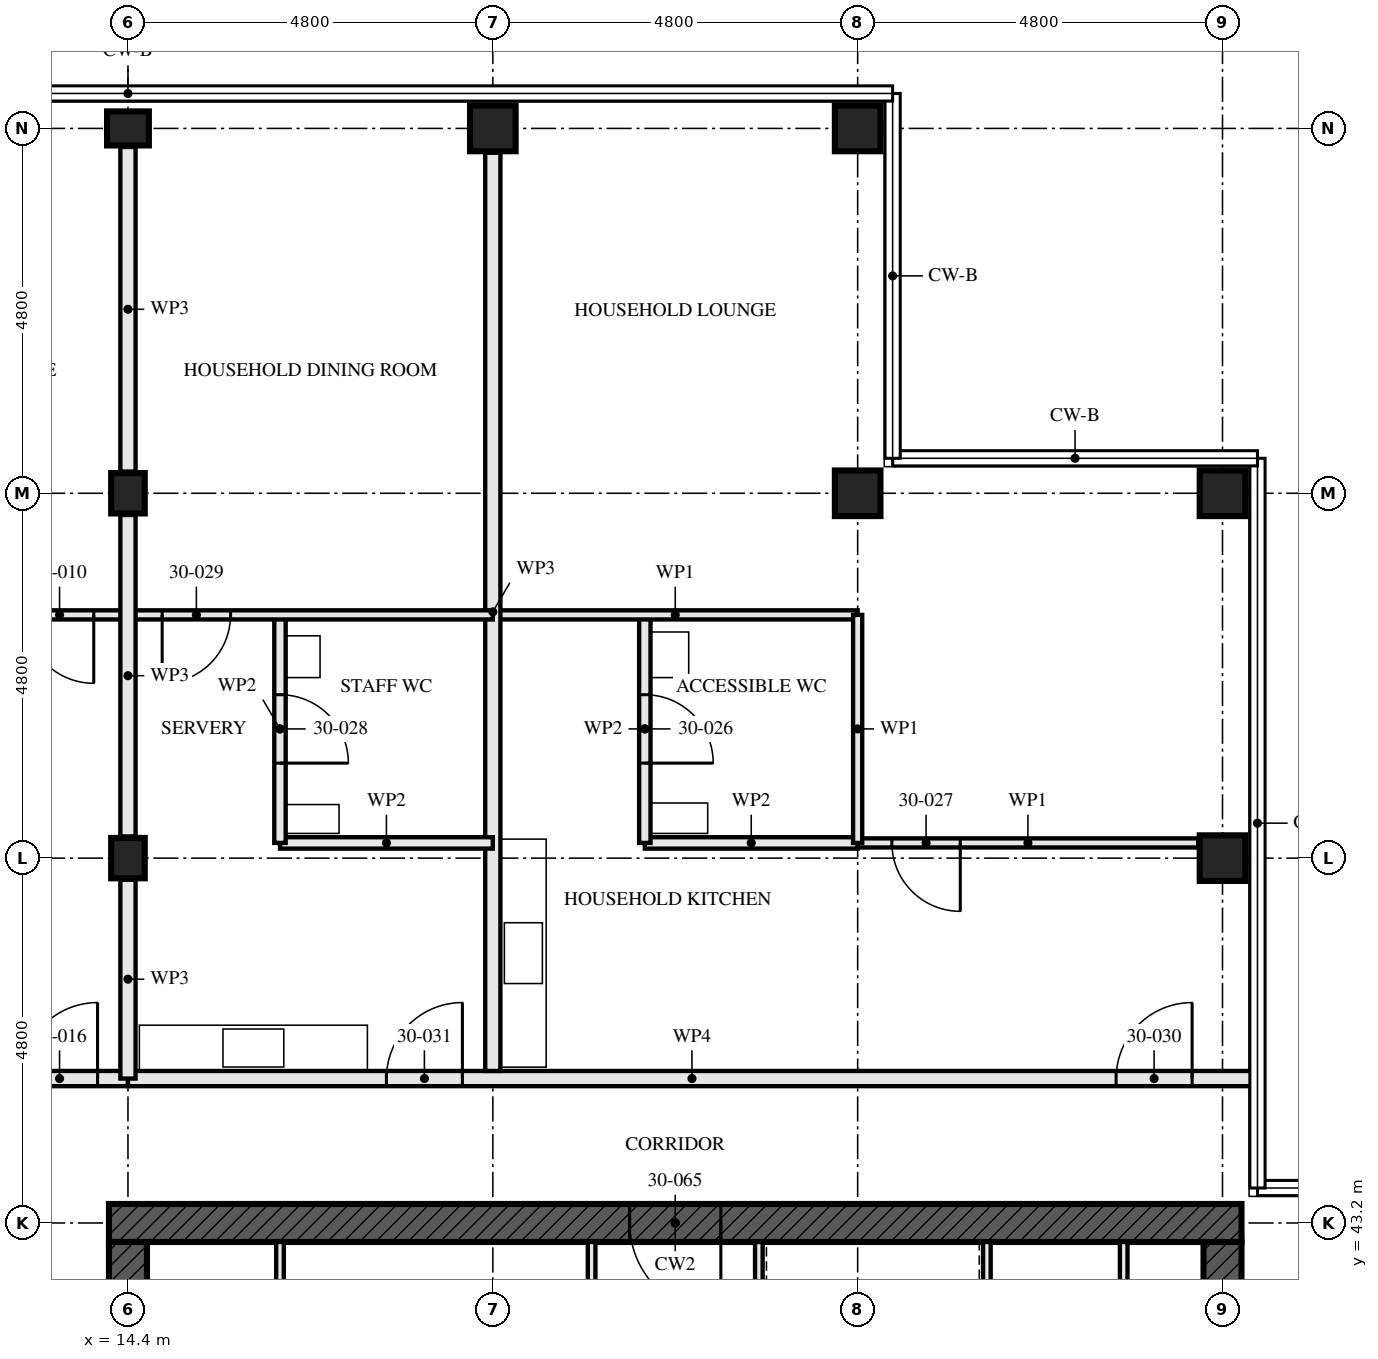
"""IFC4 building model, lengths in metres.
Left out: names, types, materials, properties, quantities, classifications, styles, units other than length and angle.
Written with IfcOpenShell. Run it as: python <this file> out.ifc"""

import sys

from ifc_helpers import new_model, si_unit, direction, frame, frame_2d, origin, origin_2d, place, context, subcontext, project, spatial, rectangle, hollow_rectangle, i_section, extrude, element, fill, save


model = new_model("IFC4")
c1 = context("Model", 3, precision=1e-05, world=origin(), true_north=direction((0.0, 1.0)))
c2 = subcontext(c1, "Body", "Model", "MODEL_VIEW")
j1 = project(units=[si_unit("LENGTHUNIT", "METRE"), si_unit("PLANEANGLEUNIT", "RADIAN")], contexts=[c1])
p1 = place(None, origin())
s1 = spatial("IfcSite", under=j1, at=p1, CompositionType="ELEMENT")
p2 = place(p1, origin())
s2 = spatial("IfcBuilding", under=s1, at=p2, CompositionType="ELEMENT")
p3 = place(p2, frame((0.0, 0.0, 112.0)))
s3 = spatial("IfcBuildingStorey", under=s2, at=p3, CompositionType="ELEMENT", Elevation=112.0)
for number, where, z_axis, x_axis in (
    (1, (14.4, 48.0, 0.0), (0.0, 0.0, 1.0), (1.0, 0.0, 0.0)),
    (2, (14.4, 52.8, 0.0), (0.0, 0.0, 1.0), (1.0, 0.0, 0.0)),
):
    element("IfcColumn", number, at=place(p3, frame(where, z_axis=z_axis, x_axis=x_axis)), inside=s3, PredefinedType="COLUMN", context=c2, shape_type="SweptSolid", body=[
        extrude(i_section(OverallWidth=0.442, OverallDepth=0.531, WebThickness=0.066, FlangeThickness=0.106, FilletRadius=0.015, at=origin_2d()), origin(), (0.0, 0.0, 1.0), 3.5),
    ])
p4 = place(p3, frame((14.4, 57.6, 0.0), z_axis=(0.0, 0.0, 1.0), x_axis=(0.0, 1.0, 0.0)))
e3 = element("IfcColumn", 3, at=p4, inside=s3, PredefinedType="COLUMN", context=c2, shape_type="SweptSolid", body=[
    extrude(i_section(OverallWidth=0.448, OverallDepth=0.55, WebThickness=0.072, FlangeThickness=0.115, FilletRadius=0.015, at=origin_2d()), origin(), (0.0, 0.0, 1.0), 3.5),
])
for number, where, z_axis, x_axis in (
    (4, (19.2, 57.6, 0.0), (0.0, 0.0, 1.0), (0.0, 1.0, 0.0)),
    (5, (24.0, 52.8, 0.0), (0.0, 0.0, 1.0), (0.0, 1.0, 0.0)),
    (6, (24.0, 57.6, 0.0), (0.0, 0.0, 1.0), (0.0, 1.0, 0.0)),
):
    element("IfcColumn", number, at=place(p3, frame(where, z_axis=z_axis, x_axis=x_axis)), inside=s3, PredefinedType="COLUMN", context=c2, shape_type="SweptSolid", body=[
        extrude(hollow_rectangle(XDim=0.6, YDim=0.6, WallThickness=0.06, at=origin_2d()), origin(), (0.0, 0.0, 1.0), 3.5),
    ])
p5 = place(p3, frame((28.8, 48.0, 0.0), z_axis=(0.0, 0.0, 1.0), x_axis=(1.0, 0.0, 0.0)))
e7 = element("IfcColumn", 7, at=p5, inside=s3, PredefinedType="COLUMN", context=c2, shape_type="SweptSolid", body=[
    extrude(hollow_rectangle(XDim=0.6, YDim=0.6, WallThickness=0.08, at=origin_2d()), origin(), (0.0, 0.0, 1.0), 3.5),
])
p6 = place(p3, frame((28.8, 52.8, 0.0), z_axis=(0.0, 0.0, 1.0), x_axis=(0.0, 1.0, 0.0)))
e8 = element("IfcColumn", 8, at=p6, inside=s3, PredefinedType="COLUMN", context=c2, shape_type="SweptSolid", body=[
    extrude(hollow_rectangle(XDim=0.6, YDim=0.6, WallThickness=0.06, at=origin_2d()), origin(), (0.0, 0.0, 1.0), 3.5),
])
p7 = place(p3, frame((29.05, 43.2, -0.17), z_axis=(0.0, 0.0, 1.0), x_axis=(-1.0, 0.0, 0.0)))
e9 = element("IfcWall", 9, at=p7, inside=s3, PredefinedType="SHEAR", context=c2, shape_type="SweptSolid", body=[
    extrude(rectangle(XDim=14.9, YDim=0.5, at=frame_2d((7.45, 0.0))), origin(), (0.0, 0.0, 1.0), 3.5),
])
p8 = place(p7, frame((6.85, 0.0, 0.17)))
e10 = element("IfcOpeningElement", 10, at=p8, cuts=e9, PredefinedType="OPENING", context=c2, shape_type="SweptSolid", body=[
    extrude(rectangle(XDim=1.2, YDim=2.1, at=frame_2d((0.6, 1.05))), frame((0.0, 0.26, 0.0), z_axis=(0.0, -1.0, 0.0), x_axis=(1.0, 0.0, 0.0)), (0.0, 0.0, 1.0), 0.521),
])
p9 = place(p3, frame((14.4, 42.95, -0.17), z_axis=(0.0, 0.0, 1.0), x_axis=(0.0, -1.0, 0.0)))
e11 = element("IfcWall", 11, at=p9, inside=s3, PredefinedType="SHEAR", context=c2, shape_type="SweptSolid", body=[
    extrude(rectangle(XDim=13.9, YDim=0.5, at=frame_2d((6.95, 0.0))), origin(), (0.0, 0.0, 1.0), 3.5),
])
p10 = place(p9, frame((6.35, 0.0, 0.17)))
e12 = element("IfcOpeningElement", 12, at=p10, cuts=e11, PredefinedType="OPENING", context=c2, shape_type="SweptSolid", body=[
    extrude(rectangle(XDim=1.2, YDim=2.1, at=frame_2d((0.6, 1.05))), frame((0.0, 0.26, 0.0), z_axis=(0.0, -1.0, 0.0), x_axis=(1.0, 0.0, 0.0)), (0.0, 0.0, 1.0), 0.521),
])
p11 = place(p3, frame((28.8, 29.05, -0.17), z_axis=(0.0, 0.0, 1.0), x_axis=(0.0, 1.0, 0.0)))
e13 = element("IfcWall", 13, at=p11, inside=s3, PredefinedType="SHEAR", context=c2, shape_type="SweptSolid", body=[
    extrude(rectangle(XDim=13.9, YDim=0.5, at=frame_2d((6.95, 0.0))), origin(), (0.0, 0.0, 1.0), 3.5),
])
p12 = place(p11, frame((6.35, 0.0, 0.17)))
e14 = element("IfcOpeningElement", 14, at=p12, cuts=e13, PredefinedType="OPENING", context=c2, shape_type="SweptSolid", body=[
    extrude(rectangle(XDim=1.2, YDim=2.1, at=frame_2d((0.6, 1.05))), frame((0.0, 0.26, 0.0), z_axis=(0.0, -1.0, 0.0), x_axis=(1.0, 0.0, 0.0)), (0.0, 0.0, 1.0), 0.521),
])
p13 = place(p3, frame((14.4, 51.2, 0.0), z_axis=(0.0, 0.0, 1.0), x_axis=(-1.0, 0.0, 0.0)))
e15 = element("IfcWall", 15, at=p13, inside=s3, PredefinedType="PARTITIONING", context=c2, shape_type="SweptSolid", body=[
    extrude(rectangle(XDim=4.8, YDim=0.12, at=frame_2d((2.4, 0.0))), origin(), (0.0, 0.0, 1.0), 3.33),
])
p14 = place(p13, frame((0.45, 0.0, 0.0)))
e16 = element("IfcOpeningElement", 16, at=p14, cuts=e15, PredefinedType="OPENING", context=c2, shape_type="SweptSolid", body=[
    extrude(rectangle(XDim=0.9, YDim=2.1, at=frame_2d((0.45, 1.05))), frame((0.0, 0.071, 0.0), z_axis=(0.0, -1.0, 0.0), x_axis=(1.0, 0.0, 0.0)), (0.0, 0.0, 1.0), 0.141),
])
p15 = place(p13, frame((2.925, 0.0, 0.0)))
e17 = element("IfcOpeningElement", 17, at=p15, cuts=e15, PredefinedType="OPENING", context=c2, shape_type="SweptSolid", body=[
    extrude(rectangle(XDim=0.95, YDim=2.1, at=frame_2d((0.475, 1.05))), frame((0.0, 0.071, 0.0), z_axis=(0.0, -1.0, 0.0), x_axis=(1.0, 0.0, 0.0)), (0.0, 0.0, 1.0), 0.141),
])
p16 = place(p3, frame((14.4, 45.1, 0.0), z_axis=(0.0, 0.0, 1.0), x_axis=(-1.0, 0.0, 0.0)))
e18 = element("IfcWall", 18, at=p16, inside=s3, PredefinedType="PARTITIONING", context=c2, shape_type="SweptSolid", body=[
    extrude(rectangle(XDim=9.6, YDim=0.2, at=frame_2d((4.8, 0.0))), origin(), (0.0, 0.0, 1.0), 3.33),
])
p17 = place(p16, frame((0.4, 0.0, 0.0)))
e19 = element("IfcOpeningElement", 19, at=p17, cuts=e18, PredefinedType="OPENING", context=c2, shape_type="SweptSolid", body=[
    extrude(rectangle(XDim=1.0, YDim=2.1, at=frame_2d((0.5, 1.05))), frame((0.0, 0.111, 0.0), z_axis=(0.0, -1.0, 0.0), x_axis=(1.0, 0.0, 0.0)), (0.0, 0.0, 1.0), 0.221),
])
p18 = place(p16, frame((5.2, 0.0, 0.0)))
e20 = element("IfcOpeningElement", 20, at=p18, cuts=e18, PredefinedType="OPENING", context=c2, shape_type="SweptSolid", body=[
    extrude(rectangle(XDim=1.0, YDim=2.1, at=frame_2d((0.5, 1.05))), frame((0.0, 0.111, 0.0), z_axis=(0.0, -1.0, 0.0), x_axis=(1.0, 0.0, 0.0)), (0.0, 0.0, 1.0), 0.221),
])
p19 = place(p3, frame((21.2, 51.2, 0.0), z_axis=(0.0, 0.0, 1.0), x_axis=(0.0, -1.0, 0.0)))
e21 = element("IfcWall", 21, at=p19, inside=s3, PredefinedType="PARTITIONING", context=c2, shape_type="SweptSolid", body=[
    extrude(rectangle(XDim=3.0, YDim=0.15, at=frame_2d((1.5, 0.0))), origin(), (0.0, 0.0, 1.0), 3.33),
])
p20 = place(p19, frame((1.05, 0.0, 0.0)))
e22 = element("IfcOpeningElement", 22, at=p20, cuts=e21, PredefinedType="OPENING", context=c2, shape_type="SweptSolid", body=[
    extrude(rectangle(XDim=0.9, YDim=2.1, at=frame_2d((0.45, 1.05))), frame((0.0, 0.085, 0.0), z_axis=(0.0, -1.0, 0.0), x_axis=(1.0, 0.0, 0.0)), (0.0, 0.0, 1.0), 0.171),
])
p21 = place(p3, frame((24.0, 48.2, 0.0), z_axis=(0.0, 0.0, 1.0), x_axis=(-1.0, 0.0, 0.0)))
e23 = element("IfcWall", 23, at=p21, inside=s3, PredefinedType="PARTITIONING", context=c2, shape_type="SweptSolid", body=[
    extrude(rectangle(XDim=2.8, YDim=0.15, at=frame_2d((1.4, 0.0))), origin(), (0.0, 0.0, 1.0), 3.33),
])
p22 = place(p3, frame((28.48, 48.2, 0.0), z_axis=(0.0, 0.0, 1.0), x_axis=(-1.0, 0.0, 0.0)))
e24 = element("IfcWall", 24, at=p22, inside=s3, PredefinedType="PARTITIONING", context=c2, shape_type="SweptSolid", body=[
    extrude(rectangle(XDim=4.48, YDim=0.12, at=frame_2d((2.24, 0.0))), origin(), (0.0, 0.0, 1.0), 3.33),
])
p23 = place(p22, frame((3.13, 0.0, 0.0)))
e25 = element("IfcOpeningElement", 25, at=p23, cuts=e24, PredefinedType="OPENING", context=c2, shape_type="SweptSolid", body=[
    extrude(rectangle(XDim=0.9, YDim=2.1, at=frame_2d((0.45, 1.05))), frame((0.0, 0.071, 0.0), z_axis=(0.0, -1.0, 0.0), x_axis=(1.0, 0.0, 0.0)), (0.0, 0.0, 1.0), 0.141),
])
p24 = place(p3, frame((24.0, 51.2, 0.0), z_axis=(0.0, 0.0, 1.0), x_axis=(-1.0, 0.0, 0.0)))
e26 = element("IfcWall", 26, at=p24, inside=s3, PredefinedType="PARTITIONING", context=c2, shape_type="SweptSolid", body=[
    extrude(rectangle(XDim=4.8, YDim=0.12, at=frame_2d((2.4, 0.0))), origin(), (0.0, 0.0, 1.0), 3.33),
])
p25 = place(p3, frame((24.0, 51.2, 0.0), z_axis=(0.0, 0.0, 1.0), x_axis=(0.0, -1.0, 0.0)))
e27 = element("IfcWall", 27, at=p25, inside=s3, PredefinedType="PARTITIONING", context=c2, shape_type="SweptSolid", body=[
    extrude(rectangle(XDim=3.0, YDim=0.12, at=frame_2d((1.5, 0.0))), origin(), (0.0, 0.0, 1.0), 3.33),
])
p26 = place(p3, frame((19.2, 57.28, 0.0), z_axis=(0.0, 0.0, 1.0), x_axis=(0.0, -1.0, 0.0)))
e28 = element("IfcWall", 28, at=p26, inside=s3, PredefinedType="PARTITIONING", context=c2, shape_type="SweptSolid", body=[
    extrude(rectangle(XDim=12.08, YDim=0.2, at=frame_2d((6.04, 0.0))), origin(), (0.0, 0.0, 1.0), 2.55),
])
p27 = place(p3, frame((16.4, 51.2, 0.0), z_axis=(0.0, 0.0, 1.0), x_axis=(0.0, -1.0, 0.0)))
e29 = element("IfcWall", 29, at=p27, inside=s3, PredefinedType="PARTITIONING", context=c2, shape_type="SweptSolid", body=[
    extrude(rectangle(XDim=3.0, YDim=0.15, at=frame_2d((1.5, 0.0))), origin(), (0.0, 0.0, 1.0), 3.33),
])
p28 = place(p27, frame((1.05, 0.0, 0.0)))
e30 = element("IfcOpeningElement", 30, at=p28, cuts=e29, PredefinedType="OPENING", context=c2, shape_type="SweptSolid", body=[
    extrude(rectangle(XDim=0.9, YDim=2.1, at=frame_2d((0.45, 1.05))), frame((0.0, 0.085, 0.0), z_axis=(0.0, -1.0, 0.0), x_axis=(1.0, 0.0, 0.0)), (0.0, 0.0, 1.0), 0.171),
])
p29 = place(p3, frame((19.2, 48.2, 0.0), z_axis=(0.0, 0.0, 1.0), x_axis=(-1.0, 0.0, 0.0)))
e31 = element("IfcWall", 31, at=p29, inside=s3, PredefinedType="PARTITIONING", context=c2, shape_type="SweptSolid", body=[
    extrude(rectangle(XDim=2.8, YDim=0.15, at=frame_2d((1.4, 0.0))), origin(), (0.0, 0.0, 1.0), 3.33),
])
p30 = place(p3, frame((19.2, 51.2, 0.0), z_axis=(0.0, 0.0, 1.0), x_axis=(-1.0, 0.0, 0.0)))
e32 = element("IfcWall", 32, at=p30, inside=s3, PredefinedType="PARTITIONING", context=c2, shape_type="SweptSolid", body=[
    extrude(rectangle(XDim=4.8, YDim=0.12, at=frame_2d((2.4, 0.0))), origin(), (0.0, 0.0, 1.0), 3.33),
])
p31 = place(p30, frame((3.45, 0.0, 0.0)))
e33 = element("IfcOpeningElement", 33, at=p31, cuts=e32, PredefinedType="OPENING", context=c2, shape_type="SweptSolid", body=[
    extrude(rectangle(XDim=0.9, YDim=2.1, at=frame_2d((0.45, 1.05))), frame((0.0, 0.071, 0.0), z_axis=(0.0, -1.0, 0.0), x_axis=(1.0, 0.0, 0.0)), (0.0, 0.0, 1.0), 0.141),
])
p32 = place(p3, frame((29.24, 45.1, 0.0), z_axis=(0.0, 0.0, 1.0), x_axis=(-1.0, 0.0, 0.0)))
e34 = element("IfcWall", 34, at=p32, inside=s3, PredefinedType="PARTITIONING", context=c2, shape_type="SweptSolid", body=[
    extrude(rectangle(XDim=14.84, YDim=0.2, at=frame_2d((7.42, 0.0))), origin(), (0.0, 0.0, 1.0), 2.32),
])
p33 = place(p32, frame((0.84, 0.0, 0.0)))
e35 = element("IfcOpeningElement", 35, at=p33, cuts=e34, PredefinedType="OPENING", context=c2, shape_type="SweptSolid", body=[
    extrude(rectangle(XDim=1.0, YDim=2.1, at=frame_2d((0.5, 1.05))), frame((0.0, 0.111, 0.0), z_axis=(0.0, -1.0, 0.0), x_axis=(1.0, 0.0, 0.0)), (0.0, 0.0, 1.0), 0.221),
])
p34 = place(p32, frame((10.44, 0.0, 0.0)))
e36 = element("IfcOpeningElement", 36, at=p34, cuts=e34, PredefinedType="OPENING", context=c2, shape_type="SweptSolid", body=[
    extrude(rectangle(XDim=1.0, YDim=2.1, at=frame_2d((0.5, 1.05))), frame((0.0, 0.111, 0.0), z_axis=(0.0, -1.0, 0.0), x_axis=(1.0, 0.0, 0.0)), (0.0, 0.0, 1.0), 0.221),
])
for number, where, z_axis, x_axis in (
    (37, (16.4, 37.15, 0.0), (0.0, 0.0, 1.0), (0.0, 1.0, 0.0)),
    (38, (27.5, 37.15, 0.0), (0.0, 0.0, 1.0), (0.0, 1.0, 0.0)),
):
    element("IfcWall", number, at=place(p3, frame(where, z_axis=z_axis, x_axis=x_axis)), inside=s3, PredefinedType="SOLIDWALL", context=c2, shape_type="SweptSolid", body=[
        extrude(rectangle(XDim=5.8, YDim=0.1, at=frame_2d((2.9, 0.0))), origin(), (0.0, 0.0, 1.0), 3.33),
    ])
p35 = place(p3, frame((20.5, 37.15, 0.0), z_axis=(0.0, 0.0, 1.0), x_axis=(0.0, 1.0, 0.0)))
e39 = element("IfcWall", 39, at=p35, inside=s3, PredefinedType="SOLIDWALL", context=c2, shape_type="SweptSolid", body=[
    extrude(rectangle(XDim=5.8, YDim=0.1, at=frame_2d((2.9, 0.0))), origin(), (0.0, 0.0, 1.0), 3.33),
])
p36 = place(p35, frame((0.925, 0.0, 0.0)))
e40 = element("IfcOpeningElement", 40, at=p36, cuts=e39, PredefinedType="OPENING", context=c2, shape_type="SweptSolid", body=[
    extrude(rectangle(XDim=1.0, YDim=2.1, at=frame_2d((0.5, 1.05))), frame((0.0, 0.061, 0.0), z_axis=(0.0, -1.0, 0.0), x_axis=(1.0, 0.0, 0.0)), (0.0, 0.0, 1.0), 0.121),
])
p37 = place(p3, frame((22.7, 37.15, 0.0), z_axis=(0.0, 0.0, 1.0), x_axis=(0.0, 1.0, 0.0)))
e41 = element("IfcWall", 41, at=p37, inside=s3, PredefinedType="SOLIDWALL", context=c2, shape_type="SweptSolid", body=[
    extrude(rectangle(XDim=5.8, YDim=0.1, at=frame_2d((2.9, 0.0))), origin(), (0.0, 0.0, 1.0), 3.33),
])
p38 = place(p37, frame((0.925, 0.0, 0.0)))
e42 = element("IfcOpeningElement", 42, at=p38, cuts=e41, PredefinedType="OPENING", context=c2, shape_type="SweptSolid", body=[
    extrude(rectangle(XDim=1.0, YDim=2.1, at=frame_2d((0.5, 1.05))), frame((0.0, 0.061, 0.0), z_axis=(0.0, -1.0, 0.0), x_axis=(1.0, 0.0, 0.0)), (0.0, 0.0, 1.0), 0.121),
])
p39 = place(p37, frame((3.9, 0.0, 0.0)))
e43 = element("IfcOpeningElement", 43, at=p39, cuts=e41, PredefinedType="OPENING", context=c2, shape_type="SweptSolid", body=[
    extrude(rectangle(XDim=1.0, YDim=2.1, at=frame_2d((0.5, 1.05))), frame((0.0, 0.061, 0.0), z_axis=(0.0, -1.0, 0.0), x_axis=(1.0, 0.0, 0.0)), (0.0, 0.0, 1.0), 0.121),
])
p40 = place(p3, frame((25.7, 37.15, 0.0), z_axis=(0.0, 0.0, 1.0), x_axis=(0.0, 1.0, 0.0)))
e44 = element("IfcWall", 44, at=p40, inside=s3, PredefinedType="SOLIDWALL", context=c2, shape_type="SweptSolid", body=[
    extrude(rectangle(XDim=5.8, YDim=0.1, at=frame_2d((2.9, 0.0))), origin(), (0.0, 0.0, 1.0), 3.33),
])
p41 = place(p3, frame((14.4, 45.1, 0.0), z_axis=(0.0, 0.0, 1.0), x_axis=(0.0, 1.0, 0.0)))
e45 = element("IfcWall", 45, at=p41, inside=s3, PredefinedType="PARTITIONING", context=c2, shape_type="SweptSolid", body=[
    extrude(rectangle(XDim=2.615, YDim=0.2, at=frame_2d((1.307, 0.0))), origin(), (0.0, 0.0, 1.0), 2.32),
])
p42 = place(p3, frame((14.4, 48.285, 0.0), z_axis=(0.0, 0.0, 1.0), x_axis=(0.0, 1.0, 0.0)))
e46 = element("IfcWall", 46, at=p42, inside=s3, PredefinedType="PARTITIONING", context=c2, shape_type="SweptSolid", body=[
    extrude(rectangle(XDim=4.229, YDim=0.2, at=frame_2d((2.115, 0.0))), origin(), (0.0, 0.0, 1.0), 2.32),
])
p43 = place(p3, frame((14.4, 53.085, 0.0), z_axis=(0.0, 0.0, 1.0), x_axis=(0.0, 1.0, 0.0)))
e47 = element("IfcWall", 47, at=p43, inside=s3, PredefinedType="PARTITIONING", context=c2, shape_type="SweptSolid", body=[
    extrude(rectangle(XDim=4.271, YDim=0.2, at=frame_2d((2.135, 0.0))), origin(), (0.0, 0.0, 1.0), 2.32),
])
p44 = place(p14, origin())
e48 = element("IfcDoor", 48, at=p44, inside=s3, OperationType="SINGLE_SWING_RIGHT", PredefinedType="DOOR", context=c2, shape_type="SweptSolid", body=[
    extrude(rectangle(XDim=0.9, YDim=2.1, at=frame_2d((0.45, 1.05))), frame((0.0, 0.022, 0.0), z_axis=(0.0, -1.0, 0.0), x_axis=(1.0, 0.0, 0.0)), (0.0, 0.0, 1.0), 0.044),
])
fill(e16, e48)
p45 = place(p17, frame((1.0, 0.0, 0.0), z_axis=(0.0, 0.0, 1.0), x_axis=(-1.0, 0.0, 0.0)))
e49 = element("IfcDoor", 49, at=p45, inside=s3, OperationType="SINGLE_SWING_LEFT", PredefinedType="DOOR", context=c2, shape_type="SweptSolid", body=[
    extrude(rectangle(XDim=1.0, YDim=2.1, at=frame_2d((0.5, 1.05))), frame((0.0, 0.027, 0.0), z_axis=(0.0, -1.0, 0.0), x_axis=(1.0, 0.0, 0.0)), (0.0, 0.0, 1.0), 0.054),
])
fill(e19, e49)
p46 = place(p20, origin())
e50 = element("IfcDoor", 50, at=p46, inside=s3, OperationType="SINGLE_SWING_LEFT", PredefinedType="DOOR", context=c2, shape_type="SweptSolid", body=[
    extrude(rectangle(XDim=0.9, YDim=2.1, at=frame_2d((0.45, 1.05))), frame((0.0, 0.022, 0.0), z_axis=(0.0, -1.0, 0.0), x_axis=(1.0, 0.0, 0.0)), (0.0, 0.0, 1.0), 0.044),
])
fill(e22, e50)
p47 = place(p23, origin())
e51 = element("IfcDoor", 51, at=p47, inside=s3, OperationType="SINGLE_SWING_RIGHT", PredefinedType="DOOR", context=c2, shape_type="SweptSolid", body=[
    extrude(rectangle(XDim=0.9, YDim=2.1, at=frame_2d((0.45, 1.05))), frame((0.0, 0.022, 0.0), z_axis=(0.0, -1.0, 0.0), x_axis=(1.0, 0.0, 0.0)), (0.0, 0.0, 1.0), 0.044),
])
fill(e25, e51)
p48 = place(p28, origin())
e52 = element("IfcDoor", 52, at=p48, inside=s3, OperationType="SINGLE_SWING_LEFT", PredefinedType="DOOR", context=c2, shape_type="SweptSolid", body=[
    extrude(rectangle(XDim=0.9, YDim=2.1, at=frame_2d((0.45, 1.05))), frame((0.0, 0.022, 0.0), z_axis=(0.0, -1.0, 0.0), x_axis=(1.0, 0.0, 0.0)), (0.0, 0.0, 1.0), 0.044),
])
fill(e30, e52)
p49 = place(p31, origin())
e53 = element("IfcDoor", 53, at=p49, inside=s3, OperationType="SINGLE_SWING_LEFT", PredefinedType="DOOR", context=c2, shape_type="SweptSolid", body=[
    extrude(rectangle(XDim=0.9, YDim=2.1, at=frame_2d((0.45, 1.05))), frame((0.0, 0.022, 0.0), z_axis=(0.0, -1.0, 0.0), x_axis=(1.0, 0.0, 0.0)), (0.0, 0.0, 1.0), 0.044),
])
fill(e33, e53)
p50 = place(p33, frame((1.0, 0.0, 0.0), z_axis=(0.0, 0.0, 1.0), x_axis=(-1.0, 0.0, 0.0)))
e54 = element("IfcDoor", 54, at=p50, inside=s3, OperationType="SINGLE_SWING_LEFT", PredefinedType="DOOR", context=c2, shape_type="SweptSolid", body=[
    extrude(rectangle(XDim=1.0, YDim=2.1, at=frame_2d((0.5, 1.05))), frame((0.0, 0.027, 0.0), z_axis=(0.0, -1.0, 0.0), x_axis=(1.0, 0.0, 0.0)), (0.0, 0.0, 1.0), 0.054),
])
fill(e35, e54)
p51 = place(p34, frame((1.0, 0.0, 0.0), z_axis=(0.0, 0.0, 1.0), x_axis=(-1.0, 0.0, 0.0)))
e55 = element("IfcDoor", 55, at=p51, inside=s3, OperationType="SINGLE_SWING_LEFT", PredefinedType="DOOR", context=c2, shape_type="SweptSolid", body=[
    extrude(rectangle(XDim=1.0, YDim=2.1, at=frame_2d((0.5, 1.05))), frame((0.0, 0.027, 0.0), z_axis=(0.0, -1.0, 0.0), x_axis=(1.0, 0.0, 0.0)), (0.0, 0.0, 1.0), 0.054),
])
fill(e36, e55)
p52 = place(p8, origin())
e56 = element("IfcDoor", 56, at=p52, inside=s3, OperationType="SINGLE_SWING_LEFT", PredefinedType="DOOR", context=c2, shape_type="SweptSolid", body=[
    extrude(rectangle(XDim=1.2, YDim=2.1, at=frame_2d((0.6, 1.05))), frame((0.0, 0.027, 0.0), z_axis=(0.0, -1.0, 0.0), x_axis=(1.0, 0.0, 0.0)), (0.0, 0.0, 1.0), 0.054),
])
fill(e10, e56)
save(model, sys.argv[1])
